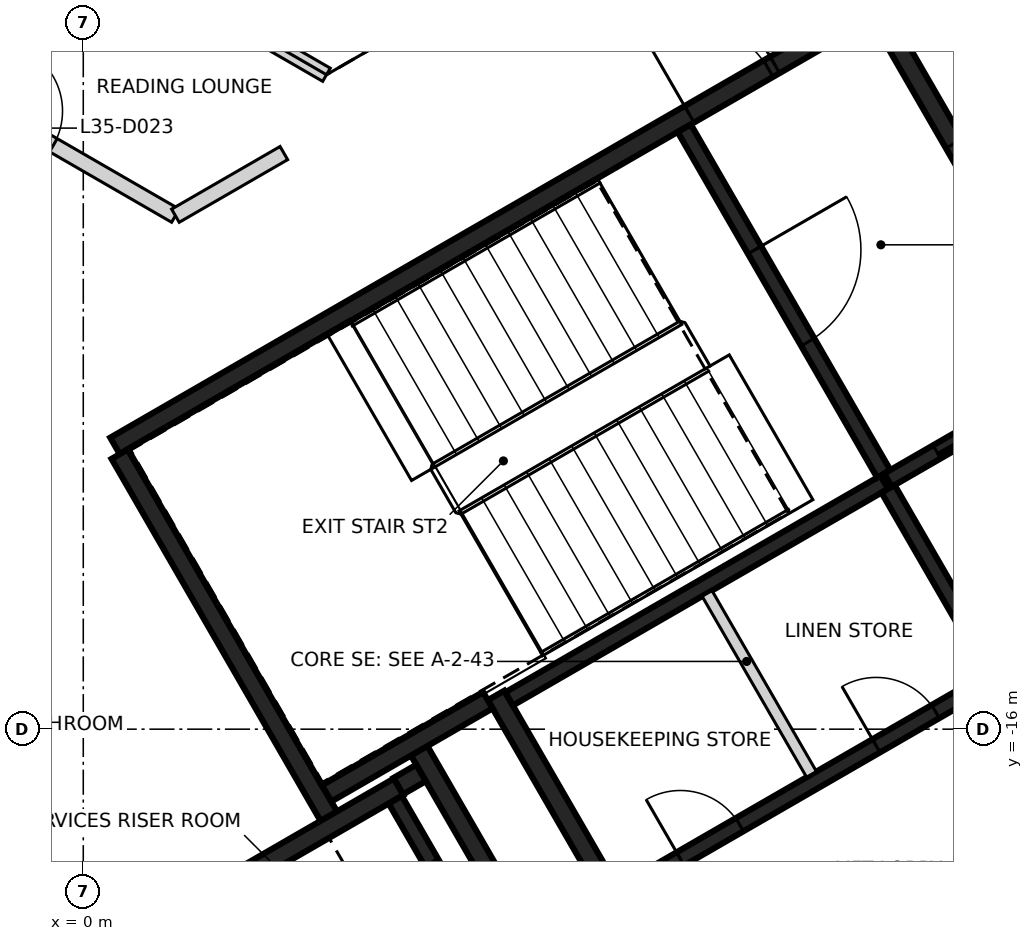
"""IFC4 building model, lengths in metres.
Left out: names, types, materials, properties, quantities, classifications, styles, units other than length and angle.
Written with IfcOpenShell. Run it as: python <this file> out.ifc"""

import sys

from ifc_helpers import new_model, si_unit, direction, frame, frame_2d, origin, place, context, subcontext, project, spatial, rectangle, extrude, element, fill, save


model = new_model("IFC4")
c1 = context("Model", 3, precision=1e-05, world=origin(), true_north=direction((0.0, 1.0)))
c2 = subcontext(c1, "Body", "Model", "MODEL_VIEW")
j1 = project(units=[si_unit("LENGTHUNIT", "METRE"), si_unit("PLANEANGLEUNIT", "RADIAN")], contexts=[c1])
p1 = place(None, origin())
s1 = spatial("IfcSite", under=j1, at=p1, CompositionType="ELEMENT")
p2 = place(p1, origin())
s2 = spatial("IfcBuilding", under=s1, at=p2, CompositionType="ELEMENT")
p3 = place(p2, frame((0.0, 0.0, 143.2)))
s3 = spatial("IfcBuildingStorey", under=s2, at=p3, CompositionType="ELEMENT", Elevation=143.2)
p4 = place(p3, frame((0.417, -12.273, 0.0), z_axis=(0.0, 0.0, 1.0), x_axis=(0.866021906294, 0.500006057782, 0.0)))
e1 = element("IfcWall", 1, at=p4, inside=s3, PredefinedType="SHEAR", context=c2, shape_type="SweptSolid", body=[
    extrude(rectangle(XDim=11.55, YDim=0.25, at=frame_2d((5.775, 0.0))), origin(), (0.0, 0.0, 1.0), 3.2),
])
p5 = place(p4, frame((10.025, 0.0, 0.0)))
e2 = element("IfcOpeningElement", 2, at=p5, cuts=e1, PredefinedType="OPENING", context=c2, shape_type="SweptSolid", body=[
    extrude(rectangle(XDim=1.2, YDim=2.1, at=frame_2d((0.6, 1.05))), frame((0.0, 0.135, 0.0), z_axis=(0.0, -1.0, 0.0), x_axis=(1.0, 0.0, 0.0)), (0.0, 0.0, 1.0), 0.27),
])
p6 = place(p4, frame((8.725, 0.0, 0.0)))
e3 = element("IfcOpeningElement", 3, at=p6, cuts=e1, PredefinedType="OPENING", context=c2, shape_type="SweptSolid", body=[
    extrude(rectangle(XDim=1.2, YDim=2.1, at=frame_2d((0.6, 1.05))), frame((0.0, 0.135, 0.0), z_axis=(0.0, -1.0, 0.0), x_axis=(1.0, 0.0, 0.0)), (0.0, 0.0, 1.0), 0.27),
])
p7 = place(p3, frame((3.235, -17.153, 0.0), z_axis=(0.0, 0.0, 1.0), x_axis=(-0.500008851346, 0.866020293397, 0.0)))
e4 = element("IfcWall", 4, at=p7, inside=s3, PredefinedType="SHEAR", context=c2, shape_type="SweptSolid", body=[
    extrude(rectangle(XDim=5.51, YDim=0.25, at=frame_2d((2.755, 0.0))), origin(), (0.0, 0.0, 1.0), 3.2),
])
p8 = place(p3, frame((10.483, -6.606, 0.0), z_axis=(0.0, 0.0, 1.0), x_axis=(0.49999885962, -0.866026062182, 0.0)))
e5 = element("IfcWall", 5, at=p8, inside=s3, PredefinedType="SHEAR", context=c2, shape_type="SweptSolid", body=[
    extrude(rectangle(XDim=5.225, YDim=0.25, at=frame_2d((2.612, 0.0))), origin(), (0.0, 0.0, 1.0), 3.2),
])
p9 = place(p8, frame((1.95, 0.0, 0.0)))
e6 = element("IfcOpeningElement", 6, at=p9, cuts=e5, PredefinedType="OPENING", context=c2, shape_type="SweptSolid", body=[
    extrude(rectangle(XDim=1.2, YDim=2.1, at=frame_2d((0.6, 1.05))), frame((0.0, 0.135, 0.0), z_axis=(0.0, -1.0, 0.0), x_axis=(1.0, 0.0, 0.0)), (0.0, 0.0, 1.0), 0.27),
])
p10 = place(p3, frame((7.031, -18.327, 0.0), z_axis=(0.0, 0.0, 1.0), x_axis=(-0.499971222258, 0.866042017984, 0.0)))
e7 = element("IfcWall", 7, at=p10, inside=s3, PredefinedType="SHEAR", context=c2, shape_type="SweptSolid", body=[
    extrude(rectangle(XDim=3.2, YDim=0.25, at=frame_2d((1.6, 0.0))), origin(), (0.0, 0.0, 1.0), 3.2),
])
p11 = place(p3, frame((1.669, -18.19, 0.0), z_axis=(0.0, 0.0, 1.0), x_axis=(0.866042235819, 0.499970844928, 0.0)))
e8 = element("IfcWall", 8, at=p11, inside=s3, PredefinedType="SHEAR", context=c2, shape_type="SweptSolid", body=[
    extrude(rectangle(XDim=2.865, YDim=0.25, at=frame_2d((1.432, 0.0))), origin(), (0.0, 0.0, 1.0), 3.2),
])
p12 = place(p3, frame((4.414, -16.276, 0.0), z_axis=(0.0, 0.0, 1.0), x_axis=(0.500003324108, -0.866023484601, 0.0)))
e9 = element("IfcWall", 9, at=p12, inside=s3, PredefinedType="SHEAR", context=c2, shape_type="SweptSolid", body=[
    extrude(rectangle(XDim=3.085, YDim=0.25, at=frame_2d((1.542, 0.0))), origin(), (0.0, 0.0, 1.0), 3.2),
])
p13 = place(p3, frame((5.322, -15.619, 0.0), z_axis=(0.0, 0.0, 1.0), x_axis=(-0.866026229868, -0.499998569178, 0.0)))
e10 = element("IfcWall", 10, at=p13, inside=s3, PredefinedType="SHEAR", context=c2, shape_type="SweptSolid", body=[
    extrude(rectangle(XDim=2.449, YDim=0.25, at=frame_2d((1.225, 0.0))), origin(), (0.0, 0.0, 1.0), 3.2),
])
p14 = place(p3, frame((4.145, -16.749, 0.0), z_axis=(0.0, 0.0, 1.0), x_axis=(0.866185586049, 0.49972245349, 0.0)))
e11 = element("IfcWall", 11, at=p14, inside=s3, PredefinedType="SHEAR", context=c2, shape_type="SweptSolid", body=[
    extrude(rectangle(XDim=0.344, YDim=0.25, at=frame_2d((0.172, 0.0))), origin(), (0.0, 0.0, 1.0), 3.2),
])
p15 = place(p3, frame((9.052, -20.48, 0.0), z_axis=(0.0, 0.0, 1.0), x_axis=(0.866030299012, 0.499991521122, 0.0)))
e12 = element("IfcWall", 12, at=p15, inside=s3, PredefinedType="SHEAR", context=c2, shape_type="SweptSolid", body=[
    extrude(rectangle(XDim=6.1, YDim=0.2, at=frame_2d((3.05, 0.0))), origin(), (0.0, 0.0, 1.0), 3.2),
])
p16 = place(p15, frame((1.0, 0.0, 0.0)))
e13 = element("IfcOpeningElement", 13, at=p16, cuts=e12, PredefinedType="OPENING", context=c2, shape_type="SweptSolid", body=[
    extrude(rectangle(XDim=1.2, YDim=2.1, at=frame_2d((0.6, 1.05))), frame((0.0, 0.11, 0.0), z_axis=(0.0, -1.0, 0.0), x_axis=(1.0, 0.0, 0.0)), (0.0, 0.0, 1.0), 0.22),
])
p17 = place(p15, frame((4.05, 0.0, 0.0)))
e14 = element("IfcOpeningElement", 14, at=p17, cuts=e12, PredefinedType="OPENING", context=c2, shape_type="SweptSolid", body=[
    extrude(rectangle(XDim=1.2, YDim=2.1, at=frame_2d((0.6, 1.05))), frame((0.0, 0.11, 0.0), z_axis=(0.0, -1.0, 0.0), x_axis=(1.0, 0.0, 0.0)), (0.0, 0.0, 1.0), 0.22),
])
p18 = place(p3, frame((10.538, -12.752, 0.0), z_axis=(0.0, 0.0, 1.0), x_axis=(-0.866038630372, -0.499977090179, 0.0)))
e15 = element("IfcWall", 15, at=p18, inside=s3, PredefinedType="SHEAR", context=c2, shape_type="SweptSolid", body=[
    extrude(rectangle(XDim=5.699, YDim=0.2, at=frame_2d((2.85, 0.0))), origin(), (0.0, 0.0, 1.0), 3.2),
])
p19 = place(p3, frame((7.077, -18.156, 0.0), z_axis=(0.0, 0.0, 1.0), x_axis=(0.866038630372, 0.499977090179, 0.0)))
e16 = element("IfcWall", 16, at=p19, inside=s3, PredefinedType="SHEAR", context=c2, shape_type="SweptSolid", body=[
    extrude(rectangle(XDim=5.699, YDim=0.2, at=frame_2d((2.85, 0.0))), origin(), (0.0, 0.0, 1.0), 3.2),
])
p20 = place(p19, frame((0.899, 0.0, 0.0)))
e17 = element("IfcOpeningElement", 17, at=p20, cuts=e16, PredefinedType="OPENING", context=c2, shape_type="SweptSolid", body=[
    extrude(rectangle(XDim=0.9, YDim=2.1, at=frame_2d((0.45, 1.05))), frame((0.0, 0.11, 0.0), z_axis=(0.0, -1.0, 0.0), x_axis=(1.0, 0.0, 0.0)), (0.0, 0.0, 1.0), 0.22),
])
p21 = place(p19, frame((3.874, 0.0, 0.0)))
e18 = element("IfcOpeningElement", 18, at=p21, cuts=e16, PredefinedType="OPENING", context=c2, shape_type="SweptSolid", body=[
    extrude(rectangle(XDim=0.9, YDim=2.1, at=frame_2d((0.45, 1.05))), frame((0.0, 0.11, 0.0), z_axis=(0.0, -1.0, 0.0), x_axis=(1.0, 0.0, 0.0)), (0.0, 0.0, 1.0), 0.22),
])
p22 = place(p3, frame((7.906, -8.094, 0.0), z_axis=(0.0, 0.0, 1.0), x_axis=(0.500024287448, -0.866011380966, 0.0)))
e19 = element("IfcWall", 19, at=p22, inside=s3, PredefinedType="SHEAR", context=c2, shape_type="SweptSolid", body=[
    extrude(rectangle(XDim=5.251, YDim=0.2, at=frame_2d((2.625, 0.0))), origin(), (0.0, 0.0, 1.0), 3.2),
])
p23 = place(p22, frame((1.849, 0.0, 0.0)))
e20 = element("IfcOpeningElement", 20, at=p23, cuts=e19, PredefinedType="OPENING", context=c2, shape_type="SweptSolid", body=[
    extrude(rectangle(XDim=1.4, YDim=2.1, at=frame_2d((0.7, 1.05))), frame((0.0, 0.11, 0.0), z_axis=(0.0, -1.0, 0.0), x_axis=(1.0, 0.0, 0.0)), (0.0, 0.0, 1.0), 0.22),
])
p24 = place(p3, frame((5.503, -19.352, 0.0), z_axis=(0.0, 0.0, 1.0), x_axis=(-0.499986818241, 0.866033014143, 0.0)))
e21 = element("IfcWall", 21, at=p24, inside=s3, PredefinedType="SHEAR", context=c2, shape_type="SweptSolid", body=[
    extrude(rectangle(XDim=2.798, YDim=0.2, at=frame_2d((1.399, 0.0))), origin(), (0.0, 0.0, 1.0), 3.2),
])
p25 = place(p24, frame((0.949, 0.0, 0.0)))
e22 = element("IfcOpeningElement", 22, at=p25, cuts=e21, PredefinedType="OPENING", context=c2, shape_type="SweptSolid", body=[
    extrude(rectangle(XDim=0.9, YDim=2.1, at=frame_2d((0.45, 1.05))), frame((0.0, 0.11, 0.0), z_axis=(0.0, -1.0, 0.0), x_axis=(1.0, 0.0, 0.0)), (0.0, 0.0, 1.0), 0.22),
])
p26 = place(p3, frame((11.963, -15.22, 0.0), z_axis=(0.0, 0.0, 1.0), x_axis=(-0.500034990121, 0.866005201286, 0.0)))
e23 = element("IfcWall", 23, at=p26, inside=s3, PredefinedType="SHEAR", context=c2, shape_type="SweptSolid", body=[
    extrude(rectangle(XDim=2.75, YDim=0.2, at=frame_2d((1.375, 0.0))), origin(), (0.0, 0.0, 1.0), 3.2),
])
p27 = place(p3, frame((10.587, -12.723, 0.0), z_axis=(0.0, 0.0, 1.0), x_axis=(0.866037306777, 0.499979382845, 0.0)))
e24 = element("IfcWall", 24, at=p27, inside=s3, PredefinedType="SHEAR", context=c2, shape_type="SweptSolid", body=[
    extrude(rectangle(XDim=2.742, YDim=0.2, at=frame_2d((1.371, 0.0))), origin(), (0.0, 0.0, 1.0), 3.2),
])
p28 = place(p27, frame((0.743, 0.0, 0.0)))
e25 = element("IfcOpeningElement", 25, at=p28, cuts=e24, PredefinedType="OPENING", context=c2, shape_type="SweptSolid", body=[
    extrude(rectangle(XDim=1.3, YDim=2.1, at=frame_2d((0.65, 1.05))), frame((0.0, 0.11, 0.0), z_axis=(0.0, -1.0, 0.0), x_axis=(1.0, 0.0, 0.0)), (0.0, 0.0, 1.0), 0.22),
])
p29 = place(p3, frame((8.207, -14.214, 0.0), z_axis=(0.0, 0.0, 1.0), x_axis=(0.50002746344, -0.86600954718, 0.0)))
e26 = element("IfcWall", 26, at=p29, inside=s3, PredefinedType="PARTITIONING", context=c2, shape_type="SweptSolid", body=[
    extrude(rectangle(XDim=2.748, YDim=0.15, at=frame_2d((1.374, 0.0))), origin(), (0.0, 0.0, 1.0), 3.2),
])
p30 = place(p3, frame((-7.455, -4.24, 0.0), z_axis=(0.0, 0.0, 1.0), x_axis=(0.866015783746, -0.500016662025, 0.0)))
e27 = element("IfcWall", 27, at=p30, inside=s3, PredefinedType="PARTITIONING", context=c2, shape_type="SweptSolid", body=[
    extrude(rectangle(XDim=10.009, YDim=0.2, at=frame_2d((5.004, 0.0))), origin(), (0.0, 0.0, 1.0), 3.2),
])
p31 = place(p30, frame((2.262, 0.0, 0.0)))
e28 = element("IfcOpeningElement", 28, at=p31, cuts=e27, PredefinedType="OPENING", context=c2, shape_type="SweptSolid", body=[
    extrude(rectangle(XDim=0.9, YDim=2.1, at=frame_2d((0.45, 1.05))), frame((0.0, 0.11, 0.0), z_axis=(0.0, -1.0, 0.0), x_axis=(1.0, 0.0, 0.0)), (0.0, 0.0, 1.0), 0.22),
])
p32 = place(p30, frame((7.254, 0.0, 0.0)))
e29 = element("IfcOpeningElement", 29, at=p32, cuts=e27, PredefinedType="OPENING", context=c2, shape_type="SweptSolid", body=[
    extrude(rectangle(XDim=0.9, YDim=2.1, at=frame_2d((0.45, 1.05))), frame((0.0, 0.11, 0.0), z_axis=(0.0, -1.0, 0.0), x_axis=(1.0, 0.0, 0.0)), (0.0, 0.0, 1.0), 0.22),
])
p33 = place(p3, frame((1.212, -9.245, 0.0), z_axis=(0.0, 0.0, 1.0), x_axis=(0.86593636949, 0.500154180222, 0.0)))
e30 = element("IfcWall", 30, at=p33, inside=s3, PredefinedType="PARTITIONING", context=c2, shape_type="SweptSolid", body=[
    extrude(rectangle(XDim=1.648, YDim=0.2, at=frame_2d((0.824, 0.0))), origin(), (0.0, 0.0, 1.0), 3.2),
])
p34 = place(p3, frame((-6.155, -1.989, 0.0), z_axis=(0.0, 0.0, 1.0), x_axis=(0.866009062299, -0.500028303215, 0.0)))
e31 = element("IfcWall", 31, at=p34, inside=s3, PredefinedType="PARTITIONING", context=c2, shape_type="SweptSolid", body=[
    extrude(rectangle(XDim=10.802, YDim=0.2, at=frame_2d((5.401, 0.0))), origin(), (0.0, 0.0, 1.0), 2.3),
])
p35 = place(p28, origin())
e32 = element("IfcDoor", 32, at=p35, inside=s3, OperationType="SLIDING_TO_RIGHT", PredefinedType="DOOR", context=c2, shape_type="SweptSolid", body=[
    extrude(rectangle(XDim=1.3, YDim=2.1, at=frame_2d((0.65, 1.05))), frame((0.0, 0.025, 0.0), z_axis=(0.0, -1.0, 0.0), x_axis=(1.0, 0.0, 0.0)), (0.0, 0.0, 1.0), 0.05),
])
fill(e25, e32)
p36 = place(p5, origin())
e33 = element("IfcDoor", 33, at=p36, inside=s3, OperationType="SINGLE_SWING_LEFT", PredefinedType="DOOR", context=c2, shape_type="SweptSolid", body=[
    extrude(rectangle(XDim=1.2, YDim=2.1, at=frame_2d((0.6, 1.05))), frame((0.0, 0.025, 0.0), z_axis=(0.0, -1.0, 0.0), x_axis=(1.0, 0.0, 0.0)), (0.0, 0.0, 1.0), 0.05),
])
fill(e2, e33)
p37 = place(p6, origin())
e34 = element("IfcDoor", 34, at=p37, inside=s3, OperationType="SINGLE_SWING_RIGHT", PredefinedType="DOOR", context=c2, shape_type="SweptSolid", body=[
    extrude(rectangle(XDim=1.2, YDim=2.1, at=frame_2d((0.6, 1.05))), frame((0.0, 0.025, 0.0), z_axis=(0.0, -1.0, 0.0), x_axis=(1.0, 0.0, 0.0)), (0.0, 0.0, 1.0), 0.05),
])
fill(e3, e34)
p38 = place(p23, origin())
e35 = element("IfcDoor", 35, at=p38, inside=s3, OperationType="SINGLE_SWING_RIGHT", PredefinedType="DOOR", context=c2, shape_type="SweptSolid", body=[
    extrude(rectangle(XDim=1.4, YDim=2.1, at=frame_2d((0.7, 1.05))), frame((0.0, 0.025, 0.0), z_axis=(0.0, -1.0, 0.0), x_axis=(1.0, 0.0, 0.0)), (0.0, 0.0, 1.0), 0.05),
])
fill(e20, e35)
p39 = place(p20, origin())
e36 = element("IfcDoor", 36, at=p39, inside=s3, OperationType="SINGLE_SWING_LEFT", PredefinedType="DOOR", context=c2, shape_type="SweptSolid", body=[
    extrude(rectangle(XDim=0.9, YDim=2.1, at=frame_2d((0.45, 1.05))), frame((0.0, 0.025, 0.0), z_axis=(0.0, -1.0, 0.0), x_axis=(1.0, 0.0, 0.0)), (0.0, 0.0, 1.0), 0.05),
])
fill(e17, e36)
p40 = place(p21, origin())
e37 = element("IfcDoor", 37, at=p40, inside=s3, OperationType="SINGLE_SWING_RIGHT", PredefinedType="DOOR", context=c2, shape_type="SweptSolid", body=[
    extrude(rectangle(XDim=0.9, YDim=2.1, at=frame_2d((0.45, 1.05))), frame((0.0, 0.025, 0.0), z_axis=(0.0, -1.0, 0.0), x_axis=(1.0, 0.0, 0.0)), (0.0, 0.0, 1.0), 0.05),
])
fill(e18, e37)
p41 = place(p9, origin())
e38 = element("IfcDoor", 38, at=p41, inside=s3, OperationType="SINGLE_SWING_LEFT", PredefinedType="DOOR", context=c2, shape_type="SweptSolid", body=[
    extrude(rectangle(XDim=1.2, YDim=2.1, at=frame_2d((0.6, 1.05))), frame((0.0, 0.025, 0.0), z_axis=(0.0, -1.0, 0.0), x_axis=(1.0, 0.0, 0.0)), (0.0, 0.0, 1.0), 0.05),
])
fill(e6, e38)
p42 = place(p32, origin())
e39 = element("IfcDoor", 39, at=p42, inside=s3, OperationType="SINGLE_SWING_LEFT", PredefinedType="DOOR", context=c2, shape_type="SweptSolid", body=[
    extrude(rectangle(XDim=0.9, YDim=2.1, at=frame_2d((0.45, 1.05))), frame((0.0, 0.025, 0.0), z_axis=(0.0, -1.0, 0.0), x_axis=(1.0, 0.0, 0.0)), (0.0, 0.0, 1.0), 0.05),
])
fill(e29, e39)
save(model, sys.argv[1])
